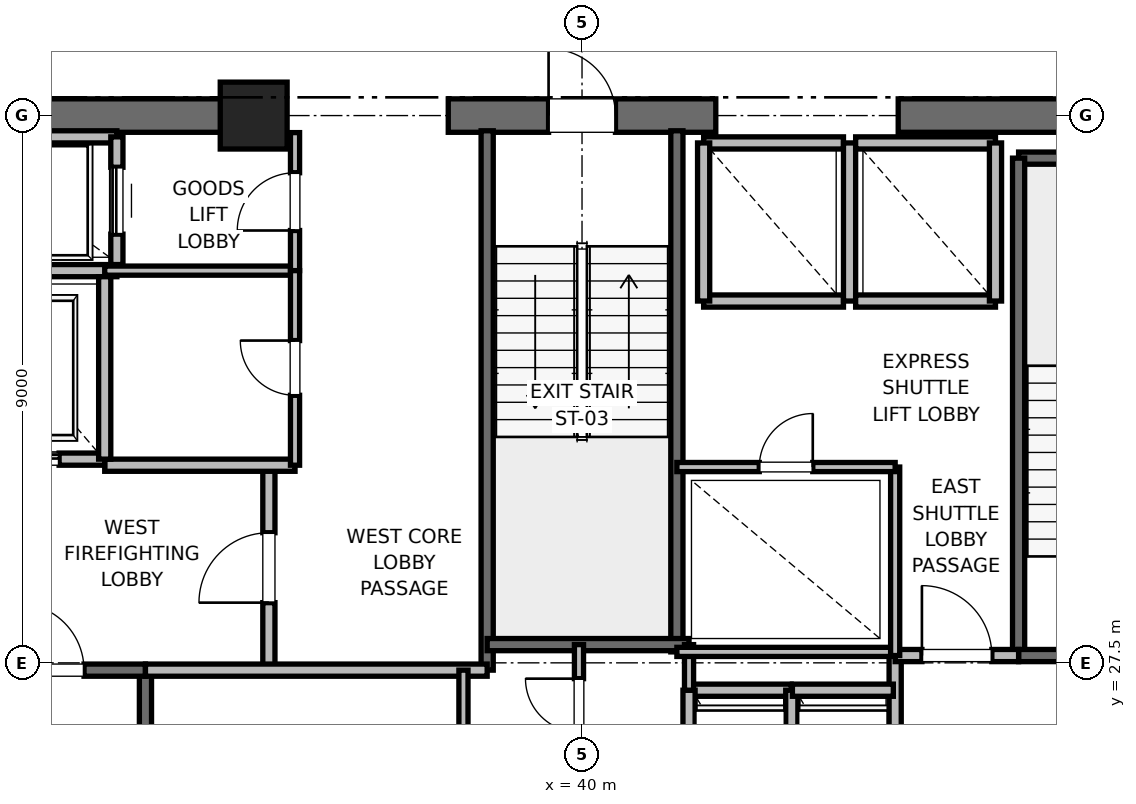
"""IFC4 building model, lengths in metres.
Left out: names, types, materials, properties, quantities, classifications, styles, units other than length and angle.
Written with IfcOpenShell. Run it as: python <this file> out.ifc"""

import sys

from ifc_helpers import new_model, si_unit, direction, frame, frame_2d, origin, origin_2d, place, context, subcontext, project, spatial, rectangle, extrude, element, fill, save


model = new_model("IFC4")
c1 = context("Model", 3, precision=1e-05, world=origin(), true_north=direction((0.0, 1.0)))
c2 = subcontext(c1, "Body", "Model", "MODEL_VIEW")
j1 = project(units=[si_unit("LENGTHUNIT", "METRE"), si_unit("PLANEANGLEUNIT", "RADIAN")], contexts=[c1])
p1 = place(None, origin())
s1 = spatial("IfcSite", under=j1, at=p1, CompositionType="ELEMENT")
p2 = place(p1, origin())
s2 = spatial("IfcBuilding", under=s1, at=p2, CompositionType="ELEMENT")
p3 = place(p2, frame((0.0, 0.0, 176.4)))
s3 = spatial("IfcBuildingStorey", under=s2, at=p3, CompositionType="ELEMENT", Elevation=176.4)
p4 = place(p3, frame((34.6, 36.5, 0.0), z_axis=(0.0, 0.0, 1.0), x_axis=(1.0, 0.0, 0.0)))
e1 = element("IfcColumn", 1, at=p4, inside=s3, PredefinedType="PILASTER", context=c2, shape_type="SweptSolid", body=[
    extrude(rectangle(XDim=1.1, YDim=1.1, at=origin_2d()), origin(), (0.0, 0.0, 1.0), 4.0),
])
p5 = place(p3, frame((29.0, 36.5, 0.0), z_axis=(0.0, 0.0, 1.0), x_axis=(1.0, 0.0, 0.0)))
e2 = element("IfcWall", 2, at=p5, inside=s3, PredefinedType="SHEAR", context=c2, shape_type="SweptSolid", body=[
    extrude(rectangle(XDim=5.8, YDim=0.55, at=frame_2d((2.9, 0.0))), origin(), (0.0, 0.0, 1.0), 3.775),
])
p6 = place(p3, frame((37.8, 36.5, 0.0), z_axis=(0.0, 0.0, 1.0), x_axis=(1.0, 0.0, 0.0)))
e3 = element("IfcWall", 3, at=p6, inside=s3, PredefinedType="SHEAR", context=c2, shape_type="SweptSolid", body=[
    extrude(rectangle(XDim=4.4, YDim=0.55, at=frame_2d((2.2, 0.0))), origin(), (0.0, 0.0, 1.0), 3.775),
])
p7 = place(p6, frame((1.65, 0.0, 0.0)))
e4 = element("IfcOpeningElement", 4, at=p7, cuts=e3, PredefinedType="OPENING", context=c2, shape_type="SweptSolid", body=[
    extrude(rectangle(XDim=1.1, YDim=2.15, at=frame_2d((0.55, 1.075))), frame((0.0, 0.275, 0.0), z_axis=(0.0, -1.0, 0.0), x_axis=(1.0, 0.0, 0.0)), (0.0, 0.0, 1.0), 0.55),
])
p8 = place(p3, frame((45.2, 36.5, 0.0), z_axis=(0.0, 0.0, 1.0), x_axis=(1.0, 0.0, 0.0)))
e5 = element("IfcWall", 5, at=p8, inside=s3, PredefinedType="SHEAR", context=c2, shape_type="SweptSolid", body=[
    extrude(rectangle(XDim=5.8, YDim=0.55, at=frame_2d((2.9, 0.0))), origin(), (0.0, 0.0, 1.0), 3.775),
])
p9 = place(p3, frame((32.82, 18.6, 0.0), z_axis=(0.0, 0.0, 1.0), x_axis=(0.0, 1.0, 0.0)))
e6 = element("IfcWall", 6, at=p9, inside=s3, PredefinedType="SOLIDWALL", context=c2, shape_type="SweptSolid", body=[
    extrude(rectangle(XDim=8.78, YDim=0.2, at=frame_2d((4.39, 0.0))), origin(), (0.0, 0.0, 1.0), 3.775),
])
p10 = place(p3, frame((29.7, 27.38, 0.0), z_axis=(0.0, 0.0, 1.0), x_axis=(1.0, 0.0, 0.0)))
e7 = element("IfcWall", 7, at=p10, inside=s3, PredefinedType="SOLIDWALL", context=c2, shape_type="SweptSolid", body=[
    extrude(rectangle(XDim=3.12, YDim=0.2, at=frame_2d((1.56, 0.0))), origin(), (0.0, 0.0, 1.0), 3.775),
])
p11 = place(p10, frame((1.01, 0.0, 0.0)))
e8 = element("IfcOpeningElement", 8, at=p11, cuts=e7, PredefinedType="OPENING", context=c2, shape_type="SweptSolid", body=[
    extrude(rectangle(XDim=1.1, YDim=2.15, at=frame_2d((0.55, 1.075))), frame((0.0, 0.1, 0.0), z_axis=(0.0, -1.0, 0.0), x_axis=(1.0, 0.0, 0.0)), (0.0, 0.0, 1.0), 0.2),
])
p12 = place(p3, frame((47.18, 35.8, 0.0), z_axis=(0.0, 0.0, 1.0), x_axis=(1.0, 0.0, 0.0)))
e9 = element("IfcWall", 9, at=p12, inside=s3, PredefinedType="SOLIDWALL", context=c2, shape_type="SweptSolid", body=[
    extrude(rectangle(XDim=3.12, YDim=0.2, at=frame_2d((1.56, 0.0))), origin(), (0.0, 0.0, 1.0), 3.775),
])
p13 = place(p3, frame((47.18, 27.62, 0.0), z_axis=(0.0, 0.0, 1.0), x_axis=(0.0, 1.0, 0.0)))
e10 = element("IfcWall", 10, at=p13, inside=s3, PredefinedType="SOLIDWALL", context=c2, shape_type="SweptSolid", body=[
    extrude(rectangle(XDim=8.18, YDim=0.2, at=frame_2d((4.09, 0.0))), origin(), (0.0, 0.0, 1.0), 3.775),
])
p14 = place(p3, frame((47.18, 27.62, 0.0), z_axis=(0.0, 0.0, 1.0), x_axis=(1.0, 0.0, 0.0)))
e11 = element("IfcWall", 11, at=p14, inside=s3, PredefinedType="SOLIDWALL", context=c2, shape_type="SweptSolid", body=[
    extrude(rectangle(XDim=3.12, YDim=0.2, at=frame_2d((1.56, 0.0))), origin(), (0.0, 0.0, 1.0), 3.775),
])
p15 = place(p14, frame((1.01, 0.0, 0.0)))
e12 = element("IfcOpeningElement", 12, at=p15, cuts=e11, PredefinedType="OPENING", context=c2, shape_type="SweptSolid", body=[
    extrude(rectangle(XDim=1.1, YDim=2.15, at=frame_2d((0.55, 1.075))), frame((0.0, 0.1, 0.0), z_axis=(0.0, -1.0, 0.0), x_axis=(1.0, 0.0, 0.0)), (0.0, 0.0, 1.0), 0.2),
])
p16 = place(p3, frame((38.44, 27.38, 0.0), z_axis=(0.0, 0.0, 1.0), x_axis=(0.0, 1.0, 0.0)))
e13 = element("IfcWall", 13, at=p16, inside=s3, PredefinedType="SOLIDWALL", context=c2, shape_type="SweptSolid", body=[
    extrude(rectangle(XDim=8.87, YDim=0.2, at=frame_2d((4.435, 0.0))), origin(), (0.0, 0.0, 1.0), 3.775),
])
p17 = place(p3, frame((41.56, 27.68, 0.0), z_axis=(0.0, 0.0, 1.0), x_axis=(0.0, 1.0, 0.0)))
e14 = element("IfcWall", 14, at=p17, inside=s3, PredefinedType="SOLIDWALL", context=c2, shape_type="SweptSolid", body=[
    extrude(rectangle(XDim=8.57, YDim=0.2, at=frame_2d((4.285, 0.0))), origin(), (0.0, 0.0, 1.0), 3.775),
])
p18 = place(p3, frame((38.44, 27.8, 0.0), z_axis=(0.0, 0.0, 1.0), x_axis=(1.0, 0.0, 0.0)))
e15 = element("IfcWall", 15, at=p18, inside=s3, PredefinedType="SOLIDWALL", context=c2, shape_type="SweptSolid", body=[
    extrude(rectangle(XDim=3.32, YDim=0.2, at=frame_2d((1.66, 0.0))), origin(), (0.0, 0.0, 1.0), 3.775),
])
p19 = place(p3, frame((34.85, 27.38, 0.0), z_axis=(0.0, 0.0, 1.0), x_axis=(0.0, 1.0, 0.0)))
e16 = element("IfcWall", 16, at=p19, inside=s3, PredefinedType="PARTITIONING", context=c2, shape_type="SweptSolid", body=[
    extrude(rectangle(XDim=3.37, YDim=0.2, at=frame_2d((1.685, 0.0))), origin(), (0.0, 0.0, 1.0), 3.775),
])
p20 = place(p19, frame((1.11, 0.0, 0.0)))
e17 = element("IfcOpeningElement", 17, at=p20, cuts=e16, PredefinedType="OPENING", context=c2, shape_type="SweptSolid", body=[
    extrude(rectangle(XDim=1.15, YDim=2.2, at=frame_2d((0.575, 1.1))), frame((0.0, 0.1, 0.0), z_axis=(0.0, -1.0, 0.0), x_axis=(1.0, 0.0, 0.0)), (0.0, 0.0, 1.0), 0.2),
])
p21 = place(p3, frame((32.82, 27.38, 0.0), z_axis=(0.0, 0.0, 1.0), x_axis=(1.0, 0.0, 0.0)))
e18 = element("IfcWall", 18, at=p21, inside=s3, PredefinedType="PARTITIONING", context=c2, shape_type="SweptSolid", body=[
    extrude(rectangle(XDim=5.62, YDim=0.2, at=frame_2d((2.81, 0.0))), origin(), (0.0, 0.0, 1.0), 3.775),
])
p22 = place(p3, frame((32.15, 30.75, 0.0), z_axis=(0.0, 0.0, 1.0), x_axis=(1.0, 0.0, 0.0)))
e19 = element("IfcWall", 19, at=p22, inside=s3, PredefinedType="PARTITIONING", context=c2, shape_type="SweptSolid", body=[
    extrude(rectangle(XDim=3.13, YDim=0.2, at=frame_2d((1.565, 0.0))), origin(), (0.0, 0.0, 1.0), 3.775),
])
p23 = place(p3, frame((45.15, 24.25, 0.0), z_axis=(0.0, 0.0, 1.0), x_axis=(0.0, 1.0, 0.0)))
e20 = element("IfcWall", 20, at=p23, inside=s3, PredefinedType="PARTITIONING", context=c2, shape_type="SweptSolid", body=[
    extrude(rectangle(XDim=3.37, YDim=0.2, at=frame_2d((1.685, 0.0))), origin(), (0.0, 0.0, 1.0), 3.775),
])
p24 = place(p3, frame((45.15, 27.62, 0.0), z_axis=(0.0, 0.0, 1.0), x_axis=(1.0, 0.0, 0.0)))
e21 = element("IfcWall", 21, at=p24, inside=s3, PredefinedType="PARTITIONING", context=c2, shape_type="SweptSolid", body=[
    extrude(rectangle(XDim=2.03, YDim=0.2, at=frame_2d((1.015, 0.0))), origin(), (0.0, 0.0, 1.0), 3.775),
])
p25 = place(p24, frame((0.44, 0.0, 0.0)))
e22 = element("IfcOpeningElement", 22, at=p25, cuts=e21, PredefinedType="OPENING", context=c2, shape_type="SweptSolid", body=[
    extrude(rectangle(XDim=1.15, YDim=2.2, at=frame_2d((0.575, 1.1))), frame((0.0, 0.1, 0.0), z_axis=(0.0, -1.0, 0.0), x_axis=(1.0, 0.0, 0.0)), (0.0, 0.0, 1.0), 0.2),
])
p26 = place(p3, frame((29.55, 30.85, 0.0), z_axis=(0.0, 0.0, 1.0), x_axis=(1.0, 0.0, 0.0)))
e23 = element("IfcWall", 23, at=p26, inside=s3, PredefinedType="SOLIDWALL", context=c2, shape_type="SweptSolid", body=[
    extrude(rectangle(XDim=2.6, YDim=0.2, at=frame_2d((1.3, 0.0))), origin(), (0.0, 0.0, 1.0), 2.755),
])
p27 = place(p26, frame((0.75, 0.0, 0.0)))
e24 = element("IfcOpeningElement", 24, at=p27, cuts=e23, PredefinedType="OPENING", context=c2, shape_type="SweptSolid", body=[
    extrude(rectangle(XDim=1.1, YDim=2.2, at=frame_2d((0.55, 1.1))), frame((0.0, 0.1, 0.0), z_axis=(0.0, -1.0, 0.0), x_axis=(1.0, 0.0, 0.0)), (0.0, 0.0, 1.0), 0.2),
])
p28 = place(p3, frame((29.55, 33.95, 0.0), z_axis=(0.0, 0.0, 1.0), x_axis=(1.0, 0.0, 0.0)))
e25 = element("IfcWall", 25, at=p28, inside=s3, PredefinedType="SOLIDWALL", context=c2, shape_type="SweptSolid", body=[
    extrude(rectangle(XDim=2.8, YDim=0.2, at=frame_2d((1.4, 0.0))), origin(), (0.0, 0.0, 1.0), 3.775),
])
p29 = place(p3, frame((32.15, 30.85, 0.0), z_axis=(0.0, 0.0, 1.0), x_axis=(0.0, 1.0, 0.0)))
e26 = element("IfcWall", 26, at=p29, inside=s3, PredefinedType="SOLIDWALL", context=c2, shape_type="SweptSolid", body=[
    extrude(rectangle(XDim=3.0, YDim=0.2, at=frame_2d((1.5, 0.0))), origin(), (0.0, 0.0, 1.0), 3.775),
])
p30 = place(p3, frame((32.35, 36.15, 0.0), z_axis=(0.0, 0.0, 1.0), x_axis=(-1.0, 0.0, 0.0)))
e27 = element("IfcWall", 27, at=p30, inside=s3, PredefinedType="SOLIDWALL", context=c2, shape_type="SweptSolid", body=[
    extrude(rectangle(XDim=2.8, YDim=0.2, at=frame_2d((1.4, 0.0))), origin(), (0.0, 0.0, 1.0), 2.985),
])
p31 = place(p3, frame((32.35, 34.05, 0.0), z_axis=(0.0, 0.0, 1.0), x_axis=(0.0, 1.0, 0.0)))
e28 = element("IfcWall", 28, at=p31, inside=s3, PredefinedType="SOLIDWALL", context=c2, shape_type="SweptSolid", body=[
    extrude(rectangle(XDim=2.1, YDim=0.2, at=frame_2d((1.05, 0.0))), origin(), (0.0, 0.0, 1.0), 3.775),
])
p32 = place(p31, frame((0.5, 0.0, 0.0)))
e29 = element("IfcOpeningElement", 29, at=p32, cuts=e28, PredefinedType="OPENING", context=c2, shape_type="SweptSolid", body=[
    extrude(rectangle(XDim=1.1, YDim=2.2, at=frame_2d((0.55, 1.1))), frame((0.0, 0.1, 0.0), z_axis=(0.0, -1.0, 0.0), x_axis=(1.0, 0.0, 0.0)), (0.0, 0.0, 1.0), 0.2),
])
p33 = place(p3, frame((43.44, 27.05, 0.0), z_axis=(0.0, 0.0, 1.0), x_axis=(-1.0, 0.0, 0.0)))
e30 = element("IfcWall", 30, at=p33, inside=s3, PredefinedType="SOLIDWALL", context=c2, shape_type="SweptSolid", body=[
    extrude(rectangle(XDim=1.68, YDim=0.2, at=frame_2d((0.84, 0.0))), origin(), (0.0, 0.0, 1.0), 3.775),
])
for number, where, z_axis, x_axis in (
    (31, (41.76, 27.05, 0.0), (0.0, 0.0, 1.0), (0.0, -1.0, 0.0)),
    (32, (43.45, 24.45, 0.0), (0.0, 0.0, 1.0), (0.0, 1.0, 0.0)),
):
    element("IfcWall", number, at=place(p3, frame(where, z_axis=z_axis, x_axis=x_axis)), inside=s3, PredefinedType="SOLIDWALL", context=c2, shape_type="SweptSolid", body=[
        extrude(rectangle(XDim=2.6, YDim=0.2, at=frame_2d((1.3, 0.0))), origin(), (0.0, 0.0, 1.0), 3.775),
    ])
p34 = place(p3, frame((45.12, 27.05, 0.0), z_axis=(0.0, 0.0, 1.0), x_axis=(-1.0, 0.0, 0.0)))
e33 = element("IfcWall", 33, at=p34, inside=s3, PredefinedType="SOLIDWALL", context=c2, shape_type="SweptSolid", body=[
    extrude(rectangle(XDim=1.66, YDim=0.2, at=frame_2d((0.83, 0.0))), origin(), (0.0, 0.0, 1.0), 3.775),
])
p35 = place(p3, frame((42.0, 33.45, 0.0), z_axis=(0.0, 0.0, 1.0), x_axis=(1.0, 0.0, 0.0)))
e34 = element("IfcWall", 34, at=p35, inside=s3, PredefinedType="SOLIDWALL", context=c2, shape_type="SweptSolid", body=[
    extrude(rectangle(XDim=2.3, YDim=0.2, at=frame_2d((1.15, 0.0))), origin(), (0.0, 0.0, 1.0), 3.775),
])
p36 = place(p3, frame((44.3, 36.05, 0.0), z_axis=(0.0, 0.0, 1.0), x_axis=(-1.0, 0.0, 0.0)))
e35 = element("IfcWall", 35, at=p36, inside=s3, PredefinedType="SOLIDWALL", context=c2, shape_type="SweptSolid", body=[
    extrude(rectangle(XDim=2.3, YDim=0.2, at=frame_2d((1.15, 0.0))), origin(), (0.0, 0.0, 1.0), 2.755),
])
for number, where, z_axis, x_axis in (
    (36, (42.0, 36.05, 0.0), (0.0, 0.0, 1.0), (0.0, -1.0, 0.0)),
    (37, (44.4, 33.45, 0.0), (0.0, 0.0, 1.0), (0.0, 1.0, 0.0)),
):
    element("IfcWall", number, at=place(p3, frame(where, z_axis=z_axis, x_axis=x_axis)), inside=s3, PredefinedType="SOLIDWALL", context=c2, shape_type="SweptSolid", body=[
        extrude(rectangle(XDim=2.6, YDim=0.2, at=frame_2d((1.3, 0.0))), origin(), (0.0, 0.0, 1.0), 2.755),
    ])
p37 = place(p3, frame((44.5, 33.45, 0.0), z_axis=(0.0, 0.0, 1.0), x_axis=(1.0, 0.0, 0.0)))
e38 = element("IfcWall", 38, at=p37, inside=s3, PredefinedType="SOLIDWALL", context=c2, shape_type="SweptSolid", body=[
    extrude(rectangle(XDim=2.3, YDim=0.2, at=frame_2d((1.15, 0.0))), origin(), (0.0, 0.0, 1.0), 3.775),
])
p38 = place(p3, frame((46.8, 36.05, 0.0), z_axis=(0.0, 0.0, 1.0), x_axis=(-1.0, 0.0, 0.0)))
e39 = element("IfcWall", 39, at=p38, inside=s3, PredefinedType="SOLIDWALL", context=c2, shape_type="SweptSolid", body=[
    extrude(rectangle(XDim=2.3, YDim=0.2, at=frame_2d((1.15, 0.0))), origin(), (0.0, 0.0, 1.0), 2.755),
])
p39 = place(p3, frame((46.8, 33.45, 0.0), z_axis=(0.0, 0.0, 1.0), x_axis=(0.0, 1.0, 0.0)))
e40 = element("IfcWall", 40, at=p39, inside=s3, PredefinedType="SOLIDWALL", context=c2, shape_type="SweptSolid", body=[
    extrude(rectangle(XDim=2.6, YDim=0.2, at=frame_2d((1.3, 0.0))), origin(), (0.0, 0.0, 1.0), 3.775),
])
p40 = place(p3, frame((41.76, 27.05, 0.0), z_axis=(0.0, 0.0, 1.0), x_axis=(0.0, 1.0, 0.0)))
e41 = element("IfcWall", 41, at=p40, inside=s3, PredefinedType="PARTITIONING", context=c2, shape_type="SweptSolid", body=[
    extrude(rectangle(XDim=0.75, YDim=0.15, at=frame_2d((0.375, 0.0))), origin(), (0.0, 0.0, 1.0), 2.85),
])
p41 = place(p3, frame((39.95, 25.8, 0.0), z_axis=(0.0, 0.0, 1.0), x_axis=(0.0, 1.0, 0.0)))
e42 = element("IfcWall", 42, at=p41, inside=s3, PredefinedType="PARTITIONING", context=c2, shape_type="SweptSolid", body=[
    extrude(rectangle(XDim=2.0, YDim=0.15, at=frame_2d((1.0, 0.0))), origin(), (0.0, 0.0, 1.0), 2.85),
])
p42 = place(p41, frame((0.56, 0.0, 0.0)))
e43 = element("IfcOpeningElement", 43, at=p42, cuts=e42, PredefinedType="OPENING", context=c2, shape_type="SweptSolid", body=[
    extrude(rectangle(XDim=0.88, YDim=2.1, at=frame_2d((0.44, 1.05))), frame((0.0, 0.075, 0.0), z_axis=(0.0, -1.0, 0.0), x_axis=(1.0, 0.0, 0.0)), (0.0, 0.0, 1.0), 0.15),
])
p43 = place(p3, frame((32.15, 33.95, 0.0), z_axis=(0.0, 0.0, 1.0), x_axis=(1.0, 0.0, 0.0)))
e44 = element("IfcWall", 44, at=p43, inside=s3, PredefinedType="PARTITIONING", context=c2, shape_type="SweptSolid", body=[
    extrude(rectangle(XDim=3.13, YDim=0.15, at=frame_2d((1.565, 0.0))), origin(), (0.0, 0.0, 1.0), 2.85),
])
p44 = place(p3, frame((35.28, 33.95, 0.0), z_axis=(0.0, 0.0, 1.0), x_axis=(0.0, 1.0, 0.0)))
e45 = element("IfcWall", 45, at=p44, inside=s3, PredefinedType="PARTITIONING", context=c2, shape_type="SweptSolid", body=[
    extrude(rectangle(XDim=2.27, YDim=0.15, at=frame_2d((1.135, 0.0))), origin(), (0.0, 0.0, 1.0), 2.755),
])
p45 = place(p44, frame((0.66, 0.0, 0.0)))
e46 = element("IfcOpeningElement", 46, at=p45, cuts=e45, PredefinedType="OPENING", context=c2, shape_type="SweptSolid", body=[
    extrude(rectangle(XDim=0.95, YDim=2.15, at=frame_2d((0.475, 1.075))), frame((0.0, 0.075, 0.0), z_axis=(0.0, -1.0, 0.0), x_axis=(1.0, 0.0, 0.0)), (0.0, 0.0, 1.0), 0.15),
])
p46 = place(p3, frame((35.28, 30.75, 0.0), z_axis=(0.0, 0.0, 1.0), x_axis=(0.0, 1.0, 0.0)))
e47 = element("IfcWall", 47, at=p46, inside=s3, PredefinedType="PARTITIONING", context=c2, shape_type="SweptSolid", body=[
    extrude(rectangle(XDim=3.2, YDim=0.15, at=frame_2d((1.6, 0.0))), origin(), (0.0, 0.0, 1.0), 2.85),
])
p47 = place(p46, frame((1.15, 0.0, 0.0)))
e48 = element("IfcOpeningElement", 48, at=p47, cuts=e47, PredefinedType="OPENING", context=c2, shape_type="SweptSolid", body=[
    extrude(rectangle(XDim=0.9, YDim=2.1, at=frame_2d((0.45, 1.05))), frame((0.0, 0.075, 0.0), z_axis=(0.0, -1.0, 0.0), x_axis=(1.0, 0.0, 0.0)), (0.0, 0.0, 1.0), 0.15),
])
p48 = place(p3, frame((38.05, 18.6, 0.0), z_axis=(0.0, 0.0, 1.0), x_axis=(0.0, 1.0, 0.0)))
e49 = element("IfcWall", 49, at=p48, inside=s3, PredefinedType="PARTITIONING", context=c2, shape_type="SweptSolid", body=[
    extrude(rectangle(XDim=8.78, YDim=0.15, at=frame_2d((4.39, 0.0))), origin(), (0.0, 0.0, 1.0), 2.755),
])
p49 = place(p48, frame((3.89, 0.0, 0.0)))
e50 = element("IfcOpeningElement", 50, at=p49, cuts=e49, PredefinedType="OPENING", context=c2, shape_type="SweptSolid", body=[
    extrude(rectangle(XDim=1.0, YDim=2.15, at=frame_2d((0.5, 1.075))), frame((0.0, 0.075, 0.0), z_axis=(0.0, -1.0, 0.0), x_axis=(1.0, 0.0, 0.0)), (0.0, 0.0, 1.0), 0.15),
])
p50 = place(p3, frame((41.56, 27.68, 0.0), z_axis=(0.0, 0.0, 1.0), x_axis=(1.0, 0.0, 0.0)))
e51 = element("IfcWall", 51, at=p50, inside=s3, PredefinedType="PARTITIONING", context=c2, shape_type="SweptSolid", body=[
    extrude(rectangle(XDim=3.59, YDim=0.15, at=frame_2d((1.795, 0.0))), origin(), (0.0, 0.0, 1.0), 2.85),
])
p51 = place(p3, frame((45.15, 27.62, 0.0), z_axis=(0.0, 0.0, 1.0), x_axis=(0.0, 1.0, 0.0)))
e52 = element("IfcWall", 52, at=p51, inside=s3, PredefinedType="PARTITIONING", context=c2, shape_type="SweptSolid", body=[
    extrude(rectangle(XDim=3.1, YDim=0.15, at=frame_2d((1.55, 0.0))), origin(), (0.0, 0.0, 1.0), 2.85),
])
p52 = place(p3, frame((41.56, 30.72, 0.0), z_axis=(0.0, 0.0, 1.0), x_axis=(1.0, 0.0, 0.0)))
e53 = element("IfcWall", 53, at=p52, inside=s3, PredefinedType="PARTITIONING", context=c2, shape_type="SweptSolid", body=[
    extrude(rectangle(XDim=3.59, YDim=0.15, at=frame_2d((1.795, 0.0))), origin(), (0.0, 0.0, 1.0), 2.85),
])
p53 = place(p52, frame((1.355, 0.0, 0.0)))
e54 = element("IfcOpeningElement", 54, at=p53, cuts=e53, PredefinedType="OPENING", context=c2, shape_type="SweptSolid", body=[
    extrude(rectangle(XDim=0.88, YDim=2.1, at=frame_2d((0.44, 1.05))), frame((0.0, 0.075, 0.0), z_axis=(0.0, -1.0, 0.0), x_axis=(1.0, 0.0, 0.0)), (0.0, 0.0, 1.0), 0.15),
])
p54 = place(p11, origin())
e55 = element("IfcDoor", 55, at=p54, inside=s3, OperationType="SINGLE_SWING_LEFT", PredefinedType="DOOR", context=c2, shape_type="SweptSolid", body=[
    extrude(rectangle(XDim=1.1, YDim=2.15, at=frame_2d((0.55, 1.075))), frame((0.0, 0.025, 0.0), z_axis=(0.0, -1.0, 0.0), x_axis=(1.0, 0.0, 0.0)), (0.0, 0.0, 1.0), 0.05),
])
fill(e8, e55)
p55 = place(p7, origin())
e56 = element("IfcDoor", 56, at=p55, inside=s3, OperationType="SINGLE_SWING_LEFT", PredefinedType="DOOR", context=c2, shape_type="SweptSolid", body=[
    extrude(rectangle(XDim=1.1, YDim=2.15, at=frame_2d((0.55, 1.075))), frame((0.0, 0.025, 0.0), z_axis=(0.0, -1.0, 0.0), x_axis=(1.0, 0.0, 0.0)), (0.0, 0.0, 1.0), 0.05),
])
fill(e4, e56)
p56 = place(p20, origin())
e57 = element("IfcDoor", 57, at=p56, inside=s3, OperationType="SINGLE_SWING_LEFT", PredefinedType="DOOR", context=c2, shape_type="SweptSolid", body=[
    extrude(rectangle(XDim=1.15, YDim=2.2, at=frame_2d((0.575, 1.1))), frame((0.0, 0.025, 0.0), z_axis=(0.0, -1.0, 0.0), x_axis=(1.0, 0.0, 0.0)), (0.0, 0.0, 1.0), 0.05),
])
fill(e17, e57)
p57 = place(p25, origin())
e58 = element("IfcDoor", 58, at=p57, inside=s3, OperationType="SINGLE_SWING_LEFT", PredefinedType="DOOR", context=c2, shape_type="SweptSolid", body=[
    extrude(rectangle(XDim=1.15, YDim=2.2, at=frame_2d((0.575, 1.1))), frame((0.0, 0.025, 0.0), z_axis=(0.0, -1.0, 0.0), x_axis=(1.0, 0.0, 0.0)), (0.0, 0.0, 1.0), 0.05),
])
fill(e22, e58)
p58 = place(p27, origin())
e59 = element("IfcDoor", 59, at=p58, inside=s3, OperationType="SLIDING_TO_RIGHT", PredefinedType="DOOR", context=c2, shape_type="SweptSolid", body=[
    extrude(rectangle(XDim=1.1, YDim=2.2, at=frame_2d((0.55, 1.1))), frame((0.0, 0.025, 0.0), z_axis=(0.0, -1.0, 0.0), x_axis=(1.0, 0.0, 0.0)), (0.0, 0.0, 1.0), 0.05),
])
fill(e24, e59)
p59 = place(p32, origin())
e60 = element("IfcDoor", 60, at=p59, inside=s3, OperationType="SLIDING_TO_RIGHT", PredefinedType="DOOR", context=c2, shape_type="SweptSolid", body=[
    extrude(rectangle(XDim=1.1, YDim=2.2, at=frame_2d((0.55, 1.1))), frame((0.0, 0.025, 0.0), z_axis=(0.0, -1.0, 0.0), x_axis=(1.0, 0.0, 0.0)), (0.0, 0.0, 1.0), 0.05),
])
fill(e29, e60)
p60 = place(p42, origin())
e61 = element("IfcDoor", 61, at=p60, inside=s3, OperationType="SINGLE_SWING_RIGHT", PredefinedType="DOOR", context=c2, shape_type="SweptSolid", body=[
    extrude(rectangle(XDim=0.88, YDim=2.1, at=frame_2d((0.44, 1.05))), frame((0.0, 0.025, 0.0), z_axis=(0.0, -1.0, 0.0), x_axis=(1.0, 0.0, 0.0)), (0.0, 0.0, 1.0), 0.05),
])
fill(e43, e61)
p61 = place(p45, origin())
e62 = element("IfcDoor", 62, at=p61, inside=s3, OperationType="SINGLE_SWING_LEFT", PredefinedType="DOOR", context=c2, shape_type="SweptSolid", body=[
    extrude(rectangle(XDim=0.95, YDim=2.15, at=frame_2d((0.475, 1.075))), frame((0.0, 0.025, 0.0), z_axis=(0.0, -1.0, 0.0), x_axis=(1.0, 0.0, 0.0)), (0.0, 0.0, 1.0), 0.05),
])
fill(e46, e62)
p62 = place(p47, origin())
e63 = element("IfcDoor", 63, at=p62, inside=s3, OperationType="SINGLE_SWING_RIGHT", PredefinedType="DOOR", context=c2, shape_type="SweptSolid", body=[
    extrude(rectangle(XDim=0.9, YDim=2.1, at=frame_2d((0.45, 1.05))), frame((0.0, 0.025, 0.0), z_axis=(0.0, -1.0, 0.0), x_axis=(1.0, 0.0, 0.0)), (0.0, 0.0, 1.0), 0.05),
])
fill(e48, e63)
p63 = place(p53, origin())
e64 = element("IfcDoor", 64, at=p63, inside=s3, OperationType="SINGLE_SWING_RIGHT", PredefinedType="DOOR", context=c2, shape_type="SweptSolid", body=[
    extrude(rectangle(XDim=0.88, YDim=2.1, at=frame_2d((0.44, 1.05))), frame((0.0, 0.025, 0.0), z_axis=(0.0, -1.0, 0.0), x_axis=(1.0, 0.0, 0.0)), (0.0, 0.0, 1.0), 0.05),
])
fill(e54, e64)
save(model, sys.argv[1])
